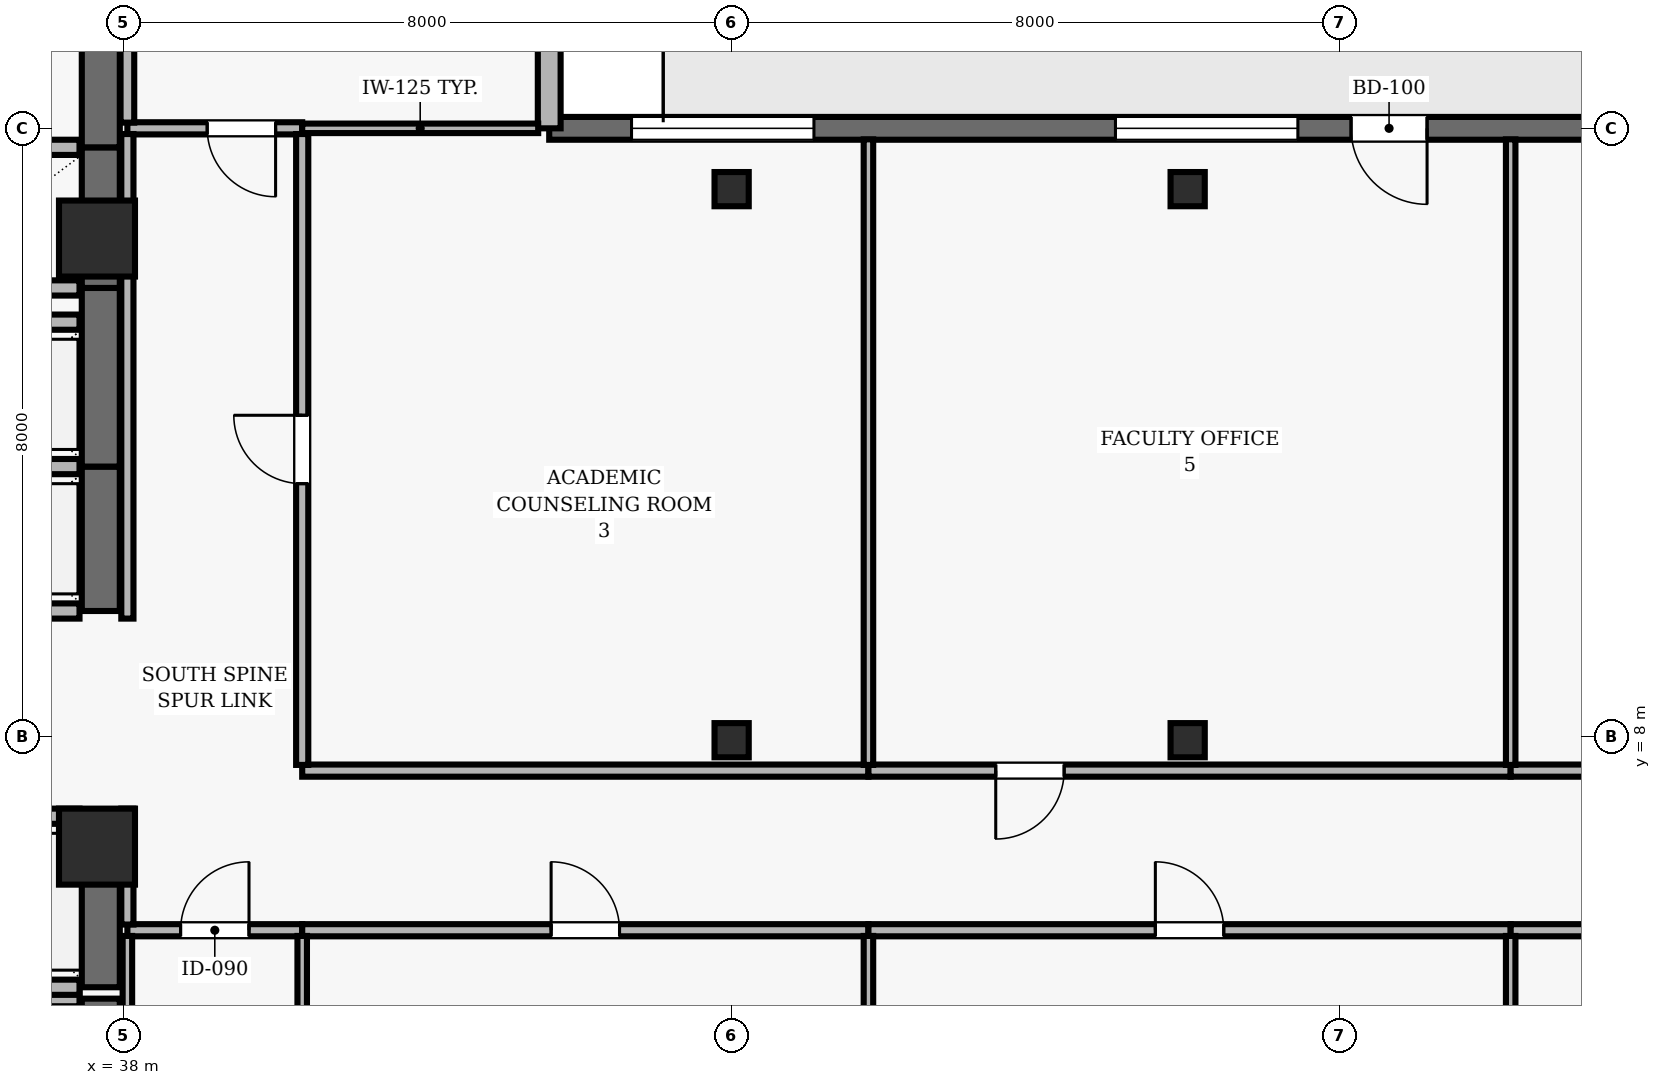
"""IFC4 building model, lengths in metres.
Left out: names, types, materials, properties, quantities, classifications, styles, units other than length and angle.
Written with IfcOpenShell. Run it as: python <this file> out.ifc"""

import sys

from ifc_helpers import new_model, si_unit, direction, frame, frame_2d, origin, origin_2d, place, context, subcontext, project, spatial, rectangle, hollow_rectangle, extrude, element, fill, save


model = new_model("IFC4")
c1 = context("Model", 3, precision=1e-05, world=origin(), true_north=direction((0.0, 1.0)))
c2 = subcontext(c1, "Body", "Model", "MODEL_VIEW")
j1 = project(units=[si_unit("LENGTHUNIT", "METRE"), si_unit("PLANEANGLEUNIT", "RADIAN")], contexts=[c1])
p1 = place(None, origin())
s1 = spatial("IfcSite", under=j1, at=p1, CompositionType="ELEMENT")
p2 = place(p1, origin())
s2 = spatial("IfcBuilding", under=s1, at=p2, CompositionType="ELEMENT")
p3 = place(p2, frame((0.0, 0.0, 222.6)))
s3 = spatial("IfcBuildingStorey", under=s2, at=p3, CompositionType="ELEMENT", Elevation=222.6)
for number, where, z_axis, x_axis in (
    (1, (37.65, 6.55, 0.0), (0.0, 0.0, 1.0), (1.0, 0.0, 0.0)),
    (2, (37.65, 14.55, 0.0), (0.0, 0.0, 1.0), (1.0, 0.0, 0.0)),
):
    element("IfcColumn", number, at=place(p3, frame(where, z_axis=z_axis, x_axis=x_axis)), inside=s3, PredefinedType="COLUMN", context=c2, shape_type="SweptSolid", body=[
        extrude(rectangle(XDim=1.0, YDim=1.0, at=origin_2d()), origin(), (0.0, 0.0, 1.0), 3.9),
    ])
for number, where, z_axis, x_axis in (
    (3, (46.0, 7.95, 0.0), (0.0, 0.0, 1.0), (1.0, 0.0, 0.0)),
    (4, (46.0, 15.2, 0.0), (0.0, 0.0, 1.0), (1.0, 0.0, 0.0)),
    (5, (52.0, 7.95, 0.0), (0.0, 0.0, 1.0), (1.0, 0.0, 0.0)),
    (6, (52.0, 15.2, 0.0), (0.0, 0.0, 1.0), (1.0, 0.0, 0.0)),
):
    element("IfcColumn", number, at=place(p3, frame(where, z_axis=z_axis, x_axis=x_axis)), inside=s3, PredefinedType="COLUMN", context=c2, shape_type="SweptSolid", body=[
        extrude(hollow_rectangle(XDim=0.45, YDim=0.45, WallThickness=0.02, at=origin_2d()), origin(), (0.0, 0.0, 1.0), 3.9),
    ])
p4 = place(p3, frame((62.7, 16.0, 0.0), z_axis=(0.0, 0.0, 1.0), x_axis=(-1.0, 0.0, 0.0)))
e7 = element("IfcWall", 7, at=p4, inside=s3, PredefinedType="SOLIDWALL", context=c2, shape_type="SweptSolid", body=[
    extrude(rectangle(XDim=19.1, YDim=0.3, at=frame_2d((9.55, 0.0))), origin(), (0.0, 0.0, 1.0), 3.69),
])
p5 = place(p4, frame((7.55, 0.0, 0.0)))
e8 = element("IfcOpeningElement", 8, at=p5, cuts=e7, PredefinedType="OPENING", context=c2, shape_type="SweptSolid", body=[
    extrude(rectangle(XDim=1.0, YDim=2.2, at=frame_2d((0.5, 1.1))), frame((0.0, 0.16, 0.0), z_axis=(0.0, -1.0, 0.0), x_axis=(1.0, 0.0, 0.0)), (0.0, 0.0, 1.0), 0.32),
])
p6 = place(p4, frame((1.983, 0.0, 0.9)))
e9 = element("IfcOpeningElement", 9, at=p6, cuts=e7, PredefinedType="OPENING", context=c2, shape_type="SweptSolid", body=[
    extrude(rectangle(XDim=2.4, YDim=2.2, at=frame_2d((1.2, 1.1))), frame((0.0, 0.16, 0.0), z_axis=(0.0, -1.0, 0.0), x_axis=(1.0, 0.0, 0.0)), (0.0, 0.0, 1.0), 0.32),
])
p7 = place(p4, frame((9.25, 0.0, 0.9)))
e10 = element("IfcOpeningElement", 10, at=p7, cuts=e7, PredefinedType="OPENING", context=c2, shape_type="SweptSolid", body=[
    extrude(rectangle(XDim=2.4, YDim=2.2, at=frame_2d((1.2, 1.1))), frame((0.0, 0.16, 0.0), z_axis=(0.0, -1.0, 0.0), x_axis=(1.0, 0.0, 0.0)), (0.0, 0.0, 1.0), 0.32),
])
p8 = place(p4, frame((15.617, 0.0, 0.9)))
e11 = element("IfcOpeningElement", 11, at=p8, cuts=e7, PredefinedType="OPENING", context=c2, shape_type="SweptSolid", body=[
    extrude(rectangle(XDim=2.4, YDim=2.2, at=frame_2d((1.2, 1.1))), frame((0.0, 0.16, 0.0), z_axis=(0.0, -1.0, 0.0), x_axis=(1.0, 0.0, 0.0)), (0.0, 0.0, 1.0), 0.32),
])
p9 = place(p3, frame((43.6, 16.0, 0.0), z_axis=(0.0, 0.0, 1.0), x_axis=(0.0, 1.0, 0.0)))
e12 = element("IfcWall", 12, at=p9, inside=s3, PredefinedType="SOLIDWALL", context=c2, shape_type="SweptSolid", body=[
    extrude(rectangle(XDim=5.0, YDim=0.3, at=frame_2d((2.5, 0.0))), origin(), (0.0, 0.0, 1.0), 3.69),
])
p10 = place(p3, frame((37.7, 2.45, 0.0), z_axis=(0.0, 0.0, 1.0), x_axis=(0.0, 1.0, 0.0)))
e13 = element("IfcWall", 13, at=p10, inside=s3, PredefinedType="SHEAR", context=c2, shape_type="SweptSolid", body=[
    extrude(rectangle(XDim=2.1, YDim=0.5, at=frame_2d((1.05, 0.0))), origin(), (0.0, 0.0, 1.0), 3.69),
])
p11 = place(p3, frame((37.42, 4.55, 0.0), z_axis=(0.0, 0.0, 1.0), x_axis=(-1.0, 0.0, 0.0)))
e14 = element("IfcWall", 14, at=p11, inside=s3, PredefinedType="SOLIDWALL", context=c2, shape_type="SweptSolid", body=[
    extrude(rectangle(XDim=2.14, YDim=0.2, at=frame_2d((1.07, 0.0))), origin(), (0.0, 0.0, 1.0), 3.69),
])
p12 = place(p3, frame((37.7, 4.7, 0.0), z_axis=(0.0, 0.0, 1.0), x_axis=(0.0, 1.0, 0.0)))
e15 = element("IfcWall", 15, at=p12, inside=s3, PredefinedType="SHEAR", context=c2, shape_type="SweptSolid", body=[
    extrude(rectangle(XDim=2.25, YDim=0.5, at=frame_2d((1.125, 0.0))), origin(), (0.0, 0.0, 1.0), 3.69),
])
for number, where, z_axis, x_axis in (
    (16, (35.28, 4.7, 0.0), (0.0, 0.0, 1.0), (1.0, 0.0, 0.0)),
    (17, (37.42, 6.95, 0.0), (0.0, 0.0, 1.0), (-1.0, 0.0, 0.0)),
):
    element("IfcWall", number, at=place(p3, frame(where, z_axis=z_axis, x_axis=x_axis)), inside=s3, PredefinedType="SOLIDWALL", context=c2, shape_type="SweptSolid", body=[
        extrude(rectangle(XDim=2.14, YDim=0.2, at=frame_2d((1.07, 0.0))), origin(), (0.0, 0.0, 1.0), 3.69),
    ])
p13 = place(p3, frame((37.7, 9.65, 0.0), z_axis=(0.0, 0.0, 1.0), x_axis=(0.0, 1.0, 0.0)))
e18 = element("IfcWall", 18, at=p13, inside=s3, PredefinedType="SHEAR", context=c2, shape_type="SweptSolid", body=[
    extrude(rectangle(XDim=1.9, YDim=0.5, at=frame_2d((0.95, 0.0))), origin(), (0.0, 0.0, 1.0), 3.69),
])
for number, where, z_axis, x_axis in (
    (19, (35.28, 9.65, 0.0), (0.0, 0.0, 1.0), (1.0, 0.0, 0.0)),
    (20, (37.42, 11.55, 0.0), (0.0, 0.0, 1.0), (-1.0, 0.0, 0.0)),
):
    element("IfcWall", number, at=place(p3, frame(where, z_axis=z_axis, x_axis=x_axis)), inside=s3, PredefinedType="SOLIDWALL", context=c2, shape_type="SweptSolid", body=[
        extrude(rectangle(XDim=2.14, YDim=0.2, at=frame_2d((1.07, 0.0))), origin(), (0.0, 0.0, 1.0), 3.69),
    ])
p14 = place(p3, frame((37.7, 11.55, 0.0), z_axis=(0.0, 0.0, 1.0), x_axis=(0.0, 1.0, 0.0)))
e21 = element("IfcWall", 21, at=p14, inside=s3, PredefinedType="SHEAR", context=c2, shape_type="SweptSolid", body=[
    extrude(rectangle(XDim=2.35, YDim=0.5, at=frame_2d((1.175, 0.0))), origin(), (0.0, 0.0, 1.0), 3.69),
])
p15 = place(p3, frame((37.42, 13.45, 0.0), z_axis=(0.0, 0.0, 1.0), x_axis=(-1.0, 0.0, 0.0)))
e22 = element("IfcWall", 22, at=p15, inside=s3, PredefinedType="SOLIDWALL", context=c2, shape_type="SweptSolid", body=[
    extrude(rectangle(XDim=2.14, YDim=0.2, at=frame_2d((1.07, 0.0))), origin(), (0.0, 0.0, 1.0), 3.69),
])
p16 = place(p3, frame((37.7, 13.9, 0.0), z_axis=(0.0, 0.0, 1.0), x_axis=(0.0, 1.0, 0.0)))
e23 = element("IfcWall", 23, at=p16, inside=s3, PredefinedType="SHEAR", context=c2, shape_type="SweptSolid", body=[
    extrude(rectangle(XDim=1.85, YDim=0.5, at=frame_2d((0.925, 0.0))), origin(), (0.0, 0.0, 1.0), 3.69),
])
for number, where, z_axis, x_axis in (
    (24, (35.28, 13.9, 0.0), (0.0, 0.0, 1.0), (1.0, 0.0, 0.0)),
    (25, (37.42, 15.75, 0.0), (0.0, 0.0, 1.0), (-1.0, 0.0, 0.0)),
):
    element("IfcWall", number, at=place(p3, frame(where, z_axis=z_axis, x_axis=x_axis)), inside=s3, PredefinedType="SOLIDWALL", context=c2, shape_type="SweptSolid", body=[
        extrude(rectangle(XDim=2.14, YDim=0.2, at=frame_2d((1.07, 0.0))), origin(), (0.0, 0.0, 1.0), 3.69),
    ])
p17 = place(p3, frame((37.7, 15.75, 0.0), z_axis=(0.0, 0.0, 1.0), x_axis=(0.0, 1.0, 0.0)))
e26 = element("IfcWall", 26, at=p17, inside=s3, PredefinedType="SHEAR", context=c2, shape_type="SweptSolid", body=[
    extrude(rectangle(XDim=1.85, YDim=0.5, at=frame_2d((0.925, 0.0))), origin(), (0.0, 0.0, 1.0), 3.69),
])
p18 = place(p3, frame((38.05, 5.45, 0.0), z_axis=(0.0, 0.0, 1.0), x_axis=(1.0, 0.0, 0.0)))
e27 = element("IfcWall", 27, at=p18, inside=s3, PredefinedType="PARTITIONING", context=c2, shape_type="SweptSolid", body=[
    extrude(rectangle(XDim=2.3, YDim=0.16, at=frame_2d((1.15, 0.0))), origin(), (0.0, 0.0, 1.0), 3.343),
])
p19 = place(p18, frame((0.7, 0.0, 0.0)))
e28 = element("IfcOpeningElement", 28, at=p19, cuts=e27, PredefinedType="OPENING", context=c2, shape_type="SweptSolid", body=[
    extrude(rectangle(XDim=0.9, YDim=2.1, at=frame_2d((0.45, 1.05))), frame((0.0, 0.09, 0.0), z_axis=(0.0, -1.0, 0.0), x_axis=(1.0, 0.0, 0.0)), (0.0, 0.0, 1.0), 0.18),
])
p20 = place(p3, frame((40.35, 5.45, 0.0), z_axis=(0.0, 0.0, 1.0), x_axis=(1.0, 0.0, 0.0)))
e29 = element("IfcWall", 29, at=p20, inside=s3, PredefinedType="PARTITIONING", context=c2, shape_type="SweptSolid", body=[
    extrude(rectangle(XDim=7.45, YDim=0.16, at=frame_2d((3.725, 0.0))), origin(), (0.0, 0.0, 1.0), 3.343),
])
p21 = place(p20, frame((3.275, 0.0, 0.0)))
e30 = element("IfcOpeningElement", 30, at=p21, cuts=e29, PredefinedType="OPENING", context=c2, shape_type="SweptSolid", body=[
    extrude(rectangle(XDim=0.9, YDim=2.1, at=frame_2d((0.45, 1.05))), frame((0.0, 0.09, 0.0), z_axis=(0.0, -1.0, 0.0), x_axis=(1.0, 0.0, 0.0)), (0.0, 0.0, 1.0), 0.18),
])
p22 = place(p3, frame((40.35, 16.0, 0.0), z_axis=(0.0, 0.0, 1.0), x_axis=(-1.0, 0.0, 0.0)))
e31 = element("IfcWall", 31, at=p22, inside=s3, PredefinedType="PARTITIONING", context=c2, shape_type="SweptSolid", body=[
    extrude(rectangle(XDim=2.3, YDim=0.16, at=frame_2d((1.15, 0.0))), origin(), (0.0, 0.0, 1.0), 3.39),
])
p23 = place(p22, frame((0.35, 0.0, 0.0)))
e32 = element("IfcOpeningElement", 32, at=p23, cuts=e31, PredefinedType="OPENING", context=c2, shape_type="SweptSolid", body=[
    extrude(rectangle(XDim=0.9, YDim=2.1, at=frame_2d((0.45, 1.05))), frame((0.0, 0.09, 0.0), z_axis=(0.0, -1.0, 0.0), x_axis=(1.0, 0.0, 0.0)), (0.0, 0.0, 1.0), 0.18),
])
p24 = place(p3, frame((40.35, 16.0, 0.0), z_axis=(0.0, 0.0, 1.0), x_axis=(1.0, 0.0, 0.0)))
e33 = element("IfcWall", 33, at=p24, inside=s3, PredefinedType="PARTITIONING", context=c2, shape_type="SweptSolid", body=[
    extrude(rectangle(XDim=3.105, YDim=0.125, at=frame_2d((1.552, 0.0))), origin(), (0.0, 0.0, 1.0), 3.39),
])
p25 = place(p3, frame((47.8, 5.45, 0.0), z_axis=(0.0, 0.0, 1.0), x_axis=(1.0, 0.0, 0.0)))
e34 = element("IfcWall", 34, at=p25, inside=s3, PredefinedType="PARTITIONING", context=c2, shape_type="SweptSolid", body=[
    extrude(rectangle(XDim=8.45, YDim=0.16, at=frame_2d((4.225, 0.0))), origin(), (0.0, 0.0, 1.0), 3.343),
])
p26 = place(p25, frame((3.775, 0.0, 0.0)))
e35 = element("IfcOpeningElement", 35, at=p26, cuts=e34, PredefinedType="OPENING", context=c2, shape_type="SweptSolid", body=[
    extrude(rectangle(XDim=0.9, YDim=2.1, at=frame_2d((0.45, 1.05))), frame((0.0, 0.09, 0.0), z_axis=(0.0, -1.0, 0.0), x_axis=(1.0, 0.0, 0.0)), (0.0, 0.0, 1.0), 0.18),
])
p27 = place(p3, frame((47.8, 7.55, 0.0), z_axis=(0.0, 0.0, 1.0), x_axis=(-1.0, 0.0, 0.0)))
e36 = element("IfcWall", 36, at=p27, inside=s3, PredefinedType="PARTITIONING", context=c2, shape_type="SweptSolid", body=[
    extrude(rectangle(XDim=7.45, YDim=0.16, at=frame_2d((3.725, 0.0))), origin(), (0.0, 0.0, 1.0), 3.139),
])
p28 = place(p3, frame((56.25, 5.45, 0.0), z_axis=(0.0, 0.0, 1.0), x_axis=(1.0, 0.0, 0.0)))
e37 = element("IfcWall", 37, at=p28, inside=s3, PredefinedType="PARTITIONING", context=c2, shape_type="SweptSolid", body=[
    extrude(rectangle(XDim=8.805, YDim=0.16, at=frame_2d((4.402, 0.0))), origin(), (0.0, 0.0, 1.0), 3.343),
])
p29 = place(p28, frame((3.953, 0.0, 0.0)))
e38 = element("IfcOpeningElement", 38, at=p29, cuts=e37, PredefinedType="OPENING", context=c2, shape_type="SweptSolid", body=[
    extrude(rectangle(XDim=0.9, YDim=2.1, at=frame_2d((0.45, 1.05))), frame((0.0, 0.09, 0.0), z_axis=(0.0, -1.0, 0.0), x_axis=(1.0, 0.0, 0.0)), (0.0, 0.0, 1.0), 0.18),
])
p30 = place(p3, frame((56.25, 7.55, 0.0), z_axis=(0.0, 0.0, 1.0), x_axis=(-1.0, 0.0, 0.0)))
e39 = element("IfcWall", 39, at=p30, inside=s3, PredefinedType="PARTITIONING", context=c2, shape_type="SweptSolid", body=[
    extrude(rectangle(XDim=8.45, YDim=0.16, at=frame_2d((4.225, 0.0))), origin(), (0.0, 0.0, 1.0), 3.139),
])
p31 = place(p30, frame((5.875, 0.0, 0.0)))
e40 = element("IfcOpeningElement", 40, at=p31, cuts=e39, PredefinedType="OPENING", context=c2, shape_type="SweptSolid", body=[
    extrude(rectangle(XDim=0.9, YDim=2.1, at=frame_2d((0.45, 1.05))), frame((0.0, 0.09, 0.0), z_axis=(0.0, -1.0, 0.0), x_axis=(1.0, 0.0, 0.0)), (0.0, 0.0, 1.0), 0.18),
])
p32 = place(p3, frame((65.055, 7.55, 0.0), z_axis=(0.0, 0.0, 1.0), x_axis=(-1.0, 0.0, 0.0)))
e41 = element("IfcWall", 41, at=p32, inside=s3, PredefinedType="PARTITIONING", context=c2, shape_type="SweptSolid", body=[
    extrude(rectangle(XDim=8.805, YDim=0.16, at=frame_2d((4.402, 0.0))), origin(), (0.0, 0.0, 1.0), 3.139),
])
p33 = place(p32, frame((3.953, 0.0, 0.0)))
e42 = element("IfcOpeningElement", 42, at=p33, cuts=e41, PredefinedType="OPENING", context=c2, shape_type="SweptSolid", body=[
    extrude(rectangle(XDim=0.9, YDim=2.1, at=frame_2d((0.45, 1.05))), frame((0.0, 0.09, 0.0), z_axis=(0.0, -1.0, 0.0), x_axis=(1.0, 0.0, 0.0)), (0.0, 0.0, 1.0), 0.18),
])
p34 = place(p3, frame((38.05, 5.375, 0.0), z_axis=(0.0, 0.0, 1.0), x_axis=(0.0, -1.0, 0.0)))
e43 = element("IfcWall", 43, at=p34, inside=s3, PredefinedType="PARTITIONING", context=c2, shape_type="SweptSolid", body=[
    extrude(rectangle(XDim=5.23, YDim=0.125, at=frame_2d((2.615, 0.0))), origin(), (0.0, 0.0, 1.0), 3.139),
])
p35 = place(p3, frame((38.05, 7.05, 0.0), z_axis=(0.0, 0.0, 1.0), x_axis=(0.0, -1.0, 0.0)))
e44 = element("IfcWall", 44, at=p35, inside=s3, PredefinedType="PARTITIONING", context=c2, shape_type="SweptSolid", body=[
    extrude(rectangle(XDim=1.525, YDim=0.16, at=frame_2d((0.763, 0.0))), origin(), (0.0, 0.0, 1.0), 3.139),
])
p36 = place(p3, frame((38.05, 15.925, 0.0), z_axis=(0.0, 0.0, 1.0), x_axis=(0.0, -1.0, 0.0)))
e45 = element("IfcWall", 45, at=p36, inside=s3, PredefinedType="PARTITIONING", context=c2, shape_type="SweptSolid", body=[
    extrude(rectangle(XDim=6.375, YDim=0.16, at=frame_2d((3.188, 0.0))), origin(), (0.0, 0.0, 1.0), 3.139),
])
p37 = place(p3, frame((38.05, 22.055, 0.0), z_axis=(0.0, 0.0, 1.0), x_axis=(0.0, -1.0, 0.0)))
e46 = element("IfcWall", 46, at=p37, inside=s3, PredefinedType="PARTITIONING", context=c2, shape_type="SweptSolid", body=[
    extrude(rectangle(XDim=5.98, YDim=0.18, at=frame_2d((2.99, 0.0))), origin(), (0.0, 0.0, 1.0), 3.139),
])
p38 = place(p3, frame((40.35, 0.145, 0.0), z_axis=(0.0, 0.0, 1.0), x_axis=(0.0, 1.0, 0.0)))
e47 = element("IfcWall", 47, at=p38, inside=s3, PredefinedType="PARTITIONING", context=c2, shape_type="SweptSolid", body=[
    extrude(rectangle(XDim=5.23, YDim=0.125, at=frame_2d((2.615, 0.0))), origin(), (0.0, 0.0, 1.0), 3.69),
])
p39 = place(p3, frame((40.35, 7.625, 0.0), z_axis=(0.0, 0.0, 1.0), x_axis=(0.0, 1.0, 0.0)))
e48 = element("IfcWall", 48, at=p39, inside=s3, PredefinedType="PARTITIONING", context=c2, shape_type="SweptSolid", body=[
    extrude(rectangle(XDim=8.3, YDim=0.16, at=frame_2d((4.15, 0.0))), origin(), (0.0, 0.0, 1.0), 3.69),
])
p40 = place(p39, frame((3.7, 0.0, 0.0)))
e49 = element("IfcOpeningElement", 49, at=p40, cuts=e48, PredefinedType="OPENING", context=c2, shape_type="SweptSolid", body=[
    extrude(rectangle(XDim=0.9, YDim=2.1, at=frame_2d((0.45, 1.05))), frame((0.0, 0.09, 0.0), z_axis=(0.0, -1.0, 0.0), x_axis=(1.0, 0.0, 0.0)), (0.0, 0.0, 1.0), 0.18),
])
p41 = place(p3, frame((47.8, 0.145, 0.0), z_axis=(0.0, 0.0, 1.0), x_axis=(0.0, 1.0, 0.0)))
e50 = element("IfcWall", 50, at=p41, inside=s3, PredefinedType="PARTITIONING", context=c2, shape_type="SweptSolid", body=[
    extrude(rectangle(XDim=5.23, YDim=0.125, at=frame_2d((2.615, 0.0))), origin(), (0.0, 0.0, 1.0), 3.69),
])
p42 = place(p3, frame((47.8, 7.625, 0.0), z_axis=(0.0, 0.0, 1.0), x_axis=(0.0, 1.0, 0.0)))
e51 = element("IfcWall", 51, at=p42, inside=s3, PredefinedType="PARTITIONING", context=c2, shape_type="SweptSolid", body=[
    extrude(rectangle(XDim=8.23, YDim=0.125, at=frame_2d((4.115, 0.0))), origin(), (0.0, 0.0, 1.0), 3.69),
])
p43 = place(p3, frame((56.25, 0.145, 0.0), z_axis=(0.0, 0.0, 1.0), x_axis=(0.0, 1.0, 0.0)))
e52 = element("IfcWall", 52, at=p43, inside=s3, PredefinedType="PARTITIONING", context=c2, shape_type="SweptSolid", body=[
    extrude(rectangle(XDim=5.23, YDim=0.125, at=frame_2d((2.615, 0.0))), origin(), (0.0, 0.0, 1.0), 3.69),
])
p44 = place(p3, frame((56.25, 7.625, 0.0), z_axis=(0.0, 0.0, 1.0), x_axis=(0.0, 1.0, 0.0)))
e53 = element("IfcWall", 53, at=p44, inside=s3, PredefinedType="PARTITIONING", context=c2, shape_type="SweptSolid", body=[
    extrude(rectangle(XDim=8.23, YDim=0.125, at=frame_2d((4.115, 0.0))), origin(), (0.0, 0.0, 1.0), 3.69),
])
p45 = place(p5, origin())
e54 = element("IfcDoor", 54, at=p45, inside=s3, OperationType="SINGLE_SWING_LEFT", PredefinedType="DOOR", context=c2, shape_type="SweptSolid", body=[
    extrude(rectangle(XDim=1.0, YDim=2.2, at=frame_2d((0.5, 1.1))), frame((0.0, 0.025, 0.0), z_axis=(0.0, -1.0, 0.0), x_axis=(1.0, 0.0, 0.0)), (0.0, 0.0, 1.0), 0.05),
])
fill(e8, e54)
p46 = place(p7, origin())
e55 = element("IfcWindow", 55, at=p46, inside=s3, PartitioningType="SINGLE_PANEL", PredefinedType="WINDOW", context=c2, shape_type="SweptSolid", body=[
    extrude(rectangle(XDim=2.4, YDim=2.2, at=frame_2d((1.2, 1.1))), frame((0.0, 0.03, 0.0), z_axis=(0.0, -1.0, 0.0), x_axis=(1.0, 0.0, 0.0)), (0.0, 0.0, 1.0), 0.06),
])
fill(e10, e55)
p47 = place(p8, origin())
e56 = element("IfcWindow", 56, at=p47, inside=s3, PartitioningType="SINGLE_PANEL", PredefinedType="WINDOW", context=c2, shape_type="SweptSolid", body=[
    extrude(rectangle(XDim=2.4, YDim=2.2, at=frame_2d((1.2, 1.1))), frame((0.0, 0.03, 0.0), z_axis=(0.0, -1.0, 0.0), x_axis=(1.0, 0.0, 0.0)), (0.0, 0.0, 1.0), 0.06),
])
fill(e11, e56)
p48 = place(p19, origin())
e57 = element("IfcDoor", 57, at=p48, inside=s3, OperationType="SINGLE_SWING_RIGHT", PredefinedType="DOOR", context=c2, shape_type="SweptSolid", body=[
    extrude(rectangle(XDim=0.9, YDim=2.1, at=frame_2d((0.45, 1.05))), frame((0.0, 0.025, 0.0), z_axis=(0.0, -1.0, 0.0), x_axis=(1.0, 0.0, 0.0)), (0.0, 0.0, 1.0), 0.05),
])
fill(e28, e57)
p49 = place(p21, origin())
e58 = element("IfcDoor", 58, at=p49, inside=s3, OperationType="SINGLE_SWING_LEFT", PredefinedType="DOOR", context=c2, shape_type="SweptSolid", body=[
    extrude(rectangle(XDim=0.9, YDim=2.1, at=frame_2d((0.45, 1.05))), frame((0.0, 0.025, 0.0), z_axis=(0.0, -1.0, 0.0), x_axis=(1.0, 0.0, 0.0)), (0.0, 0.0, 1.0), 0.05),
])
fill(e30, e58)
p50 = place(p40, origin())
e59 = element("IfcDoor", 59, at=p50, inside=s3, OperationType="SINGLE_SWING_RIGHT", PredefinedType="DOOR", context=c2, shape_type="SweptSolid", body=[
    extrude(rectangle(XDim=0.9, YDim=2.1, at=frame_2d((0.45, 1.05))), frame((0.0, 0.025, 0.0), z_axis=(0.0, -1.0, 0.0), x_axis=(1.0, 0.0, 0.0)), (0.0, 0.0, 1.0), 0.05),
])
fill(e49, e59)
p51 = place(p26, origin())
e60 = element("IfcDoor", 60, at=p51, inside=s3, OperationType="SINGLE_SWING_LEFT", PredefinedType="DOOR", context=c2, shape_type="SweptSolid", body=[
    extrude(rectangle(XDim=0.9, YDim=2.1, at=frame_2d((0.45, 1.05))), frame((0.0, 0.025, 0.0), z_axis=(0.0, -1.0, 0.0), x_axis=(1.0, 0.0, 0.0)), (0.0, 0.0, 1.0), 0.05),
])
fill(e35, e60)
p52 = place(p31, origin())
e61 = element("IfcDoor", 61, at=p52, inside=s3, OperationType="SINGLE_SWING_RIGHT", PredefinedType="DOOR", context=c2, shape_type="SweptSolid", body=[
    extrude(rectangle(XDim=0.9, YDim=2.1, at=frame_2d((0.45, 1.05))), frame((0.0, 0.025, 0.0), z_axis=(0.0, -1.0, 0.0), x_axis=(1.0, 0.0, 0.0)), (0.0, 0.0, 1.0), 0.05),
])
fill(e40, e61)
p53 = place(p23, origin())
e62 = element("IfcDoor", 62, at=p53, inside=s3, OperationType="SINGLE_SWING_LEFT", PredefinedType="DOOR", context=c2, shape_type="SweptSolid", body=[
    extrude(rectangle(XDim=0.9, YDim=2.1, at=frame_2d((0.45, 1.05))), frame((0.0, 0.025, 0.0), z_axis=(0.0, -1.0, 0.0), x_axis=(1.0, 0.0, 0.0)), (0.0, 0.0, 1.0), 0.05),
])
fill(e32, e62)
save(model, sys.argv[1])
